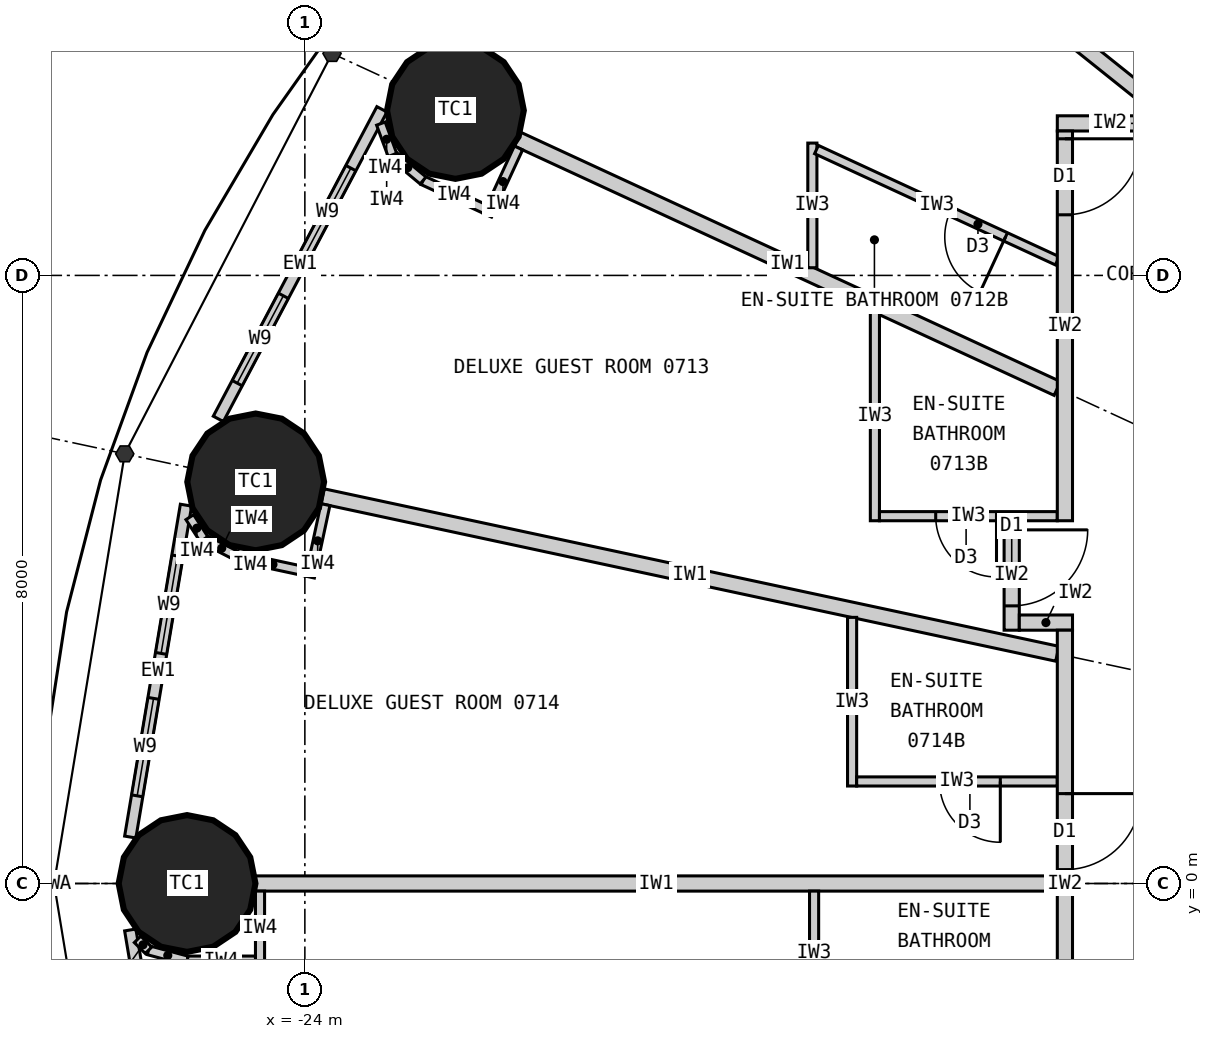
"""IFC4 building model, lengths in metres.
Left out: names, types, materials, properties, quantities, classifications, styles, units other than length and angle.
Written with IfcOpenShell. Run it as: python <this file> out.ifc"""

import sys

from ifc_helpers import new_model, si_unit, direction, frame, frame_2d, origin, origin_2d, place, context, subcontext, project, spatial, rectangle, circle, extrude, element, fill, save


model = new_model("IFC4")
c1 = context("Model", 3, precision=1e-05, world=origin(), true_north=direction((0.0, 1.0)))
c2 = subcontext(c1, "Body", "Model", "MODEL_VIEW")
j1 = project(units=[si_unit("LENGTHUNIT", "METRE"), si_unit("PLANEANGLEUNIT", "RADIAN")], contexts=[c1])
p1 = place(None, origin())
s1 = spatial("IfcSite", under=j1, at=p1, CompositionType="ELEMENT")
p2 = place(p1, origin())
s2 = spatial("IfcBuilding", under=s1, at=p2, CompositionType="ELEMENT")
p3 = place(p2, frame((0.0, 0.0, 36.0)))
s3 = spatial("IfcBuildingStorey", under=s2, at=p3, CompositionType="ELEMENT", Elevation=36.0)
for number, where, z_axis, x_axis in (
    (1, (-22.019, 10.17, 0.0), (0.0, 0.0, 1.0), (1.0, 0.0, 0.0)),
    (2, (-24.647, 5.283, 0.0), (0.0, 0.0, 1.0), (1.0, 0.0, 0.0)),
    (3, (-25.55, 0.0, 0.0), (0.0, 0.0, 1.0), (1.0, 0.0, 0.0)),
):
    element("IfcColumn", number, at=place(p3, frame(where, z_axis=z_axis, x_axis=x_axis)), inside=s3, PredefinedType="COLUMN", context=c2, shape_type="SweptSolid", body=[
        extrude(circle(Radius=0.9, at=origin_2d()), origin(), (0.0, 0.0, 1.0), 3.3),
    ])
p4 = place(p3, frame((-22.986, 10.185, 0.0), z_axis=(0.0, 0.0, 1.0), x_axis=(-0.467303182954, -0.884097129959, 0.0)))
e4 = element("IfcWall", 4, at=p4, inside=s3, PredefinedType="ELEMENTEDWALL", context=c2, shape_type="SweptSolid", body=[
    extrude(rectangle(XDim=4.606, YDim=0.15, at=frame_2d((2.303, 0.0))), origin(), (0.0, 0.0, 1.0), 3.12),
])
p5 = place(p4, frame((0.875, 0.0, 0.9)))
e5 = element("IfcOpeningElement", 5, at=p5, cuts=e4, PredefinedType="OPENING", context=c2, shape_type="SweptSolid", body=[
    extrude(rectangle(XDim=1.3, YDim=1.9, at=frame_2d((0.65, 0.95))), frame((0.0, 0.085, 0.0), z_axis=(0.0, -1.0, 0.0), x_axis=(1.0, 0.0, 0.0)), (0.0, 0.0, 1.0), 0.17),
])
p6 = place(p4, frame((2.775, 0.0, 0.9)))
e6 = element("IfcOpeningElement", 6, at=p6, cuts=e4, PredefinedType="OPENING", context=c2, shape_type="SweptSolid", body=[
    extrude(rectangle(XDim=1.3, YDim=1.9, at=frame_2d((0.65, 0.95))), frame((0.0, 0.085, 0.0), z_axis=(0.0, -1.0, 0.0), x_axis=(1.0, 0.0, 0.0)), (0.0, 0.0, 1.0), 0.17),
])
p7 = place(p3, frame((-25.564, 4.978, 0.0), z_axis=(0.0, 0.0, 1.0), x_axis=(-0.165641751141, -0.986185991727, 0.0)))
e7 = element("IfcWall", 7, at=p7, inside=s3, PredefinedType="ELEMENTEDWALL", context=c2, shape_type="SweptSolid", body=[
    extrude(rectangle(XDim=4.428, YDim=0.15, at=frame_2d((2.214, 0.0))), origin(), (0.0, 0.0, 1.0), 3.12),
])
p8 = place(p7, frame((0.678, 0.0, 0.9)))
e8 = element("IfcOpeningElement", 8, at=p8, cuts=e7, PredefinedType="OPENING", context=c2, shape_type="SweptSolid", body=[
    extrude(rectangle(XDim=1.3, YDim=1.9, at=frame_2d((0.65, 0.95))), frame((0.0, 0.085, 0.0), z_axis=(0.0, -1.0, 0.0), x_axis=(1.0, 0.0, 0.0)), (0.0, 0.0, 1.0), 0.17),
])
p9 = place(p7, frame((2.578, 0.0, 0.9)))
e9 = element("IfcOpeningElement", 9, at=p9, cuts=e7, PredefinedType="OPENING", context=c2, shape_type="SweptSolid", body=[
    extrude(rectangle(XDim=1.3, YDim=1.9, at=frame_2d((0.65, 0.95))), frame((0.0, 0.085, 0.0), z_axis=(0.0, -1.0, 0.0), x_axis=(1.0, 0.0, 0.0)), (0.0, 0.0, 1.0), 0.17),
])
p10 = place(p3, frame((-26.297, -0.611, 0.0), z_axis=(0.0, 0.0, 1.0), x_axis=(0.165641751141, -0.986185991727, 0.0)))
e10 = element("IfcWall", 10, at=p10, inside=s3, PredefinedType="ELEMENTEDWALL", context=c2, shape_type="SweptSolid", body=[
    extrude(rectangle(XDim=4.428, YDim=0.15, at=frame_2d((2.214, 0.0))), origin(), (0.0, 0.0, 1.0), 3.12),
])
p11 = place(p10, frame((0.55, 0.0, 0.9)))
e11 = element("IfcOpeningElement", 11, at=p11, cuts=e10, PredefinedType="OPENING", context=c2, shape_type="SweptSolid", body=[
    extrude(rectangle(XDim=1.3, YDim=1.9, at=frame_2d((0.65, 0.95))), frame((0.0, 0.085, 0.0), z_axis=(0.0, -1.0, 0.0), x_axis=(1.0, 0.0, 0.0)), (0.0, 0.0, 1.0), 0.17),
])
p12 = place(p10, frame((2.45, 0.0, 0.9)))
e12 = element("IfcOpeningElement", 12, at=p12, cuts=e10, PredefinedType="OPENING", context=c2, shape_type="SweptSolid", body=[
    extrude(rectangle(XDim=1.3, YDim=1.9, at=frame_2d((0.65, 0.95))), frame((0.0, 0.085, 0.0), z_axis=(0.0, -1.0, 0.0), x_axis=(1.0, 0.0, 0.0)), (0.0, 0.0, 1.0), 0.17),
])
p13 = place(p3, frame((-12.625, 10.1, 0.0), z_axis=(0.0, 0.0, 1.0), x_axis=(-0.780872884676, 0.624689953479, 0.0)))
e13 = element("IfcWall", 13, at=p13, inside=s3, PredefinedType="PARTITIONING", context=c2, shape_type="SweptSolid", body=[
    extrude(rectangle(XDim=5.845, YDim=0.2, at=frame_2d((2.922, 0.0))), origin(), (0.0, 0.0, 1.0), 2.32),
])
p14 = place(p3, frame((-14.1, 6.512, 0.0), z_axis=(0.0, 0.0, 1.0), x_axis=(-0.907842433118, 0.41931147925, 0.0)))
e14 = element("IfcWall", 14, at=p14, inside=s3, PredefinedType="PARTITIONING", context=c2, shape_type="SweptSolid", body=[
    extrude(rectangle(XDim=7.823, YDim=0.2, at=frame_2d((3.912, 0.0))), origin(), (0.0, 0.0, 1.0), 2.32),
])
p15 = place(p3, frame((-14.1, 3.022, 0.0), z_axis=(0.0, 0.0, 1.0), x_axis=(-0.977786510688, 0.209603290805, 0.0)))
e15 = element("IfcWall", 15, at=p15, inside=s3, PredefinedType="PARTITIONING", context=c2, shape_type="SweptSolid", body=[
    extrude(rectangle(XDim=9.887, YDim=0.2, at=frame_2d((4.943, 0.0))), origin(), (0.0, 0.0, 1.0), 2.32),
])
p16 = place(p3, frame((-14.1, 0.0, 0.0), z_axis=(0.0, 0.0, 1.0), x_axis=(-1.0, 0.0, 0.0)))
e16 = element("IfcWall", 16, at=p16, inside=s3, PredefinedType="PARTITIONING", context=c2, shape_type="SweptSolid", body=[
    extrude(rectangle(XDim=10.55, YDim=0.2, at=frame_2d((5.275, 0.0))), origin(), (0.0, 0.0, 1.0), 2.27),
])
p17 = place(p3, frame((-17.323, 8.101, 0.0), z_axis=(0.0, 0.0, 1.0), x_axis=(0.0, 1.0, 0.0)))
e17 = element("IfcWall", 17, at=p17, inside=s3, PredefinedType="PARTITIONING", context=c2, shape_type="SweptSolid", body=[
    extrude(rectangle(XDim=1.64, YDim=0.12, at=frame_2d((0.82, 0.0))), origin(), (0.0, 0.0, 1.0), 3.12),
])
p18 = place(p3, frame((-14.1, 8.193, 0.0), z_axis=(0.0, 0.0, 1.0), x_axis=(-0.907836493557, 0.419324338628, 0.0)))
e18 = element("IfcWall", 18, at=p18, inside=s3, PredefinedType="PARTITIONING", context=c2, shape_type="SweptSolid", body=[
    extrude(rectangle(XDim=3.49, YDim=0.12, at=frame_2d((1.745, 0.0))), origin(), (0.0, 0.0, 1.0), 3.12),
])
p19 = place(p18, frame((0.75, 0.0, 0.0)))
e19 = element("IfcOpeningElement", 19, at=p19, cuts=e18, PredefinedType="OPENING", context=c2, shape_type="SweptSolid", body=[
    extrude(rectangle(XDim=0.8, YDim=2.1, at=frame_2d((0.4, 1.05))), frame((0.0, 0.07, 0.0), z_axis=(0.0, -1.0, 0.0), x_axis=(1.0, 0.0, 0.0)), (0.0, 0.0, 1.0), 0.14),
])
p20 = place(p3, frame((-16.5, 7.521, 0.0), z_axis=(0.0, 0.0, 1.0), x_axis=(0.0, -1.0, 0.0)))
e20 = element("IfcWall", 20, at=p20, inside=s3, PredefinedType="PARTITIONING", context=c2, shape_type="SweptSolid", body=[
    extrude(rectangle(XDim=2.749, YDim=0.12, at=frame_2d((1.374, 0.0))), origin(), (0.0, 0.0, 1.0), 3.12),
])
p21 = place(p3, frame((-14.1, 4.833, 0.0), z_axis=(0.0, 0.0, 1.0), x_axis=(-1.0, 0.0, 0.0)))
e21 = element("IfcWall", 21, at=p21, inside=s3, PredefinedType="PARTITIONING", context=c2, shape_type="SweptSolid", body=[
    extrude(rectangle(XDim=2.34, YDim=0.12, at=frame_2d((1.17, 0.0))), origin(), (0.0, 0.0, 1.0), 3.12),
])
p22 = place(p21, frame((0.8, 0.0, 0.0)))
e22 = element("IfcOpeningElement", 22, at=p22, cuts=e21, PredefinedType="OPENING", context=c2, shape_type="SweptSolid", body=[
    extrude(rectangle(XDim=0.8, YDim=2.1, at=frame_2d((0.4, 1.05))), frame((0.0, 0.07, 0.0), z_axis=(0.0, -1.0, 0.0), x_axis=(1.0, 0.0, 0.0)), (0.0, 0.0, 1.0), 0.14),
])
p23 = place(p3, frame((-16.8, 3.501, 0.0), z_axis=(0.0, 0.0, 1.0), x_axis=(0.0, -1.0, 0.0)))
e23 = element("IfcWall", 23, at=p23, inside=s3, PredefinedType="PARTITIONING", context=c2, shape_type="SweptSolid", body=[
    extrude(rectangle(XDim=2.219, YDim=0.12, at=frame_2d((1.109, 0.0))), origin(), (0.0, 0.0, 1.0), 3.12),
])
p24 = place(p3, frame((-14.1, 1.343, 0.0), z_axis=(0.0, 0.0, 1.0), x_axis=(-1.0, 0.0, 0.0)))
e24 = element("IfcWall", 24, at=p24, inside=s3, PredefinedType="PARTITIONING", context=c2, shape_type="SweptSolid", body=[
    extrude(rectangle(XDim=2.64, YDim=0.12, at=frame_2d((1.32, 0.0))), origin(), (0.0, 0.0, 1.0), 3.12),
])
p25 = place(p24, frame((0.75, 0.0, 0.0)))
e25 = element("IfcOpeningElement", 25, at=p25, cuts=e24, PredefinedType="OPENING", context=c2, shape_type="SweptSolid", body=[
    extrude(rectangle(XDim=0.8, YDim=2.1, at=frame_2d((0.4, 1.05))), frame((0.0, 0.07, 0.0), z_axis=(0.0, -1.0, 0.0), x_axis=(1.0, 0.0, 0.0)), (0.0, 0.0, 1.0), 0.14),
])
p26 = place(p3, frame((-17.3, -0.1, 0.0), z_axis=(0.0, 0.0, 1.0), x_axis=(0.0, -1.0, 0.0)))
e26 = element("IfcWall", 26, at=p26, inside=s3, PredefinedType="PARTITIONING", context=c2, shape_type="SweptSolid", body=[
    extrude(rectangle(XDim=1.64, YDim=0.12, at=frame_2d((0.82, 0.0))), origin(), (0.0, 0.0, 1.0), 3.12),
])
p27 = place(p3, frame((-14.7, 4.772, 0.0), z_axis=(0.0, 0.0, 1.0), x_axis=(0.0, -1.0, 0.0)))
e27 = element("IfcWall", 27, at=p27, inside=s3, PredefinedType="PARTITIONING", context=c2, shape_type="SweptSolid", body=[
    extrude(rectangle(XDim=1.44, YDim=0.2, at=frame_2d((0.72, 0.0))), origin(), (0.0, 0.0, 1.0), 3.12),
])
p28 = place(p27, frame((0.12, 0.0, 0.0)))
e28 = element("IfcOpeningElement", 28, at=p28, cuts=e27, PredefinedType="OPENING", context=c2, shape_type="SweptSolid", body=[
    extrude(rectangle(XDim=1.0, YDim=2.2, at=frame_2d((0.5, 1.1))), frame((0.0, 0.11, 0.0), z_axis=(0.0, -1.0, 0.0), x_axis=(1.0, 0.0, 0.0)), (0.0, 0.0, 1.0), 0.22),
])
p29 = place(p3, frame((-13.9, 3.433, 0.0), z_axis=(0.0, 0.0, 1.0), x_axis=(-1.0, 0.0, 0.0)))
e29 = element("IfcWall", 29, at=p29, inside=s3, PredefinedType="PARTITIONING", context=c2, shape_type="SweptSolid", body=[
    extrude(rectangle(XDim=0.7, YDim=0.2, at=frame_2d((0.35, 0.0))), origin(), (0.0, 0.0, 1.0), 2.32),
])
p30 = place(p3, frame((-14.1, 10.0, 0.0), z_axis=(0.0, 0.0, 1.0), x_axis=(1.0, 0.0, 0.0)))
e30 = element("IfcWall", 30, at=p30, inside=s3, PredefinedType="PARTITIONING", context=c2, shape_type="SweptSolid", body=[
    extrude(rectangle(XDim=2.481, YDim=0.2, at=frame_2d((1.24, 0.0))), origin(), (0.0, 0.0, 1.0), 3.12),
])
p31 = place(p3, frame((-14.0, 9.9, 0.0), z_axis=(0.0, 0.0, 1.0), x_axis=(0.0, -1.0, 0.0)))
e31 = element("IfcWall", 31, at=p31, inside=s3, PredefinedType="PARTITIONING", context=c2, shape_type="SweptSolid", body=[
    extrude(rectangle(XDim=5.127, YDim=0.2, at=frame_2d((2.564, 0.0))), origin(), (0.0, 0.0, 1.0), 3.12),
])
p32 = place(p31, frame((0.103, 0.0, 0.0)))
e32 = element("IfcOpeningElement", 32, at=p32, cuts=e31, PredefinedType="OPENING", context=c2, shape_type="SweptSolid", body=[
    extrude(rectangle(XDim=1.0, YDim=2.2, at=frame_2d((0.5, 1.1))), frame((0.0, 0.11, 0.0), z_axis=(0.0, -1.0, 0.0), x_axis=(1.0, 0.0, 0.0)), (0.0, 0.0, 1.0), 0.22),
])
p33 = place(p3, frame((-14.0, 3.333, 0.0), z_axis=(0.0, 0.0, 1.0), x_axis=(0.0, -1.0, 0.0)))
e33 = element("IfcWall", 33, at=p33, inside=s3, PredefinedType="PARTITIONING", context=c2, shape_type="SweptSolid", body=[
    extrude(rectangle(XDim=6.665, YDim=0.2, at=frame_2d((3.333, 0.0))), origin(), (0.0, 0.0, 1.0), 3.12),
])
p34 = place(p33, frame((2.15, 0.0, 0.0)))
e34 = element("IfcOpeningElement", 34, at=p34, cuts=e33, PredefinedType="OPENING", context=c2, shape_type="SweptSolid", body=[
    extrude(rectangle(XDim=1.0, YDim=2.2, at=frame_2d((0.5, 1.1))), frame((0.0, 0.11, 0.0), z_axis=(0.0, -1.0, 0.0), x_axis=(1.0, 0.0, 0.0)), (0.0, 0.0, 1.0), 0.22),
])
p35 = place(p33, frame((5.173, 0.0, 0.0)))
e35 = element("IfcOpeningElement", 35, at=p35, cuts=e33, PredefinedType="OPENING", context=c2, shape_type="SweptSolid", body=[
    extrude(rectangle(XDim=1.0, YDim=2.2, at=frame_2d((0.5, 1.1))), frame((0.0, 0.11, 0.0), z_axis=(0.0, -1.0, 0.0), x_axis=(1.0, 0.0, 0.0)), (0.0, 0.0, 1.0), 0.22),
])
p36 = place(p3, frame((-21.189, 9.677, 0.0), z_axis=(0.0, 0.0, 1.0), x_axis=(-0.419344098106, -0.907827366509, 0.0)))
e36 = element("IfcWall", 36, at=p36, inside=s3, PredefinedType="PARTITIONING", context=c2, shape_type="SweptSolid", body=[
    extrude(rectangle(XDim=0.975, YDim=0.12, at=frame_2d((0.487, 0.0))), origin(), (0.0, 0.0, 1.0), 3.12),
])
p37 = place(p3, frame((-21.627, 8.872, 0.0), z_axis=(0.0, 0.0, 1.0), x_axis=(-0.907935564339, 0.419109783957, 0.0)))
e37 = element("IfcWall", 37, at=p37, inside=s3, PredefinedType="PARTITIONING", context=c2, shape_type="SweptSolid", body=[
    extrude(rectangle(XDim=0.9, YDim=0.12, at=frame_2d((0.45, 0.0))), origin(), (0.0, 0.0, 1.0), 3.12),
])
p38 = place(p3, frame((-22.445, 9.249, 0.0), z_axis=(0.0, 0.0, 1.0), x_axis=(-0.768335565584, 0.640047231584, 0.0)))
e38 = element("IfcWall", 38, at=p38, inside=s3, PredefinedType="PARTITIONING", context=c2, shape_type="SweptSolid", body=[
    extrude(rectangle(XDim=0.525, YDim=0.12, at=frame_2d((0.263, 0.0))), origin(), (0.0, 0.0, 1.0), 3.12),
])
p39 = place(p3, frame((-22.848, 9.585, 0.0), z_axis=(0.0, 0.0, 1.0), x_axis=(-0.345267312673, 0.938504386138, 0.0)))
e39 = element("IfcWall", 39, at=p39, inside=s3, PredefinedType="PARTITIONING", context=c2, shape_type="SweptSolid", body=[
    extrude(rectangle(XDim=0.439, YDim=0.12, at=frame_2d((0.22, 0.0))), origin(), (0.0, 0.0, 1.0), 3.12),
])
p40 = place(p3, frame((-23.729, 4.984, 0.0), z_axis=(0.0, 0.0, 1.0), x_axis=(-0.20968306268, -0.977769406979, 0.0)))
e40 = element("IfcWall", 40, at=p40, inside=s3, PredefinedType="PARTITIONING", context=c2, shape_type="SweptSolid", body=[
    extrude(rectangle(XDim=0.975, YDim=0.12, at=frame_2d((0.487, 0.0))), origin(), (0.0, 0.0, 1.0), 3.12),
])
p41 = place(p3, frame((-23.98, 4.103, 0.0), z_axis=(0.0, 0.0, 1.0), x_axis=(-0.977762694187, 0.209714362543, 0.0)))
e41 = element("IfcWall", 41, at=p41, inside=s3, PredefinedType="PARTITIONING", context=c2, shape_type="SweptSolid", body=[
    extrude(rectangle(XDim=0.9, YDim=0.12, at=frame_2d((0.45, 0.0))), origin(), (0.0, 0.0, 1.0), 3.12),
])
p42 = place(p3, frame((-24.86, 4.291, 0.0), z_axis=(0.0, 0.0, 1.0), x_axis=(-0.890204323062, 0.455561481254, 0.0)))
e42 = element("IfcWall", 42, at=p42, inside=s3, PredefinedType="PARTITIONING", context=c2, shape_type="SweptSolid", body=[
    extrude(rectangle(XDim=0.525, YDim=0.12, at=frame_2d((0.263, 0.0))), origin(), (0.0, 0.0, 1.0), 3.12),
])
p43 = place(p3, frame((-25.327, 4.531, 0.0), z_axis=(0.0, 0.0, 1.0), x_axis=(-0.543516034791, 0.839398784801, 0.0)))
e43 = element("IfcWall", 43, at=p43, inside=s3, PredefinedType="PARTITIONING", context=c2, shape_type="SweptSolid", body=[
    extrude(rectangle(XDim=0.344, YDim=0.12, at=frame_2d((0.172, 0.0))), origin(), (0.0, 0.0, 1.0), 3.12),
])
p44 = place(p3, frame((-24.59, -0.1, 0.0), z_axis=(0.0, 0.0, 1.0), x_axis=(0.0, -1.0, 0.0)))
e44 = element("IfcWall", 44, at=p44, inside=s3, PredefinedType="PARTITIONING", context=c2, shape_type="SweptSolid", body=[
    extrude(rectangle(XDim=0.974, YDim=0.12, at=frame_2d((0.487, 0.0))), origin(), (0.0, 0.0, 1.0), 3.12),
])
p45 = place(p3, frame((-24.65, -1.015, 0.0), z_axis=(0.0, 0.0, 1.0), x_axis=(-1.0, 0.0, 0.0)))
e45 = element("IfcWall", 45, at=p45, inside=s3, PredefinedType="PARTITIONING", context=c2, shape_type="SweptSolid", body=[
    extrude(rectangle(XDim=0.9, YDim=0.12, at=frame_2d((0.45, 0.0))), origin(), (0.0, 0.0, 1.0), 3.12),
])
p46 = place(p3, frame((-25.55, -1.015, 0.0), z_axis=(0.0, 0.0, 1.0), x_axis=(-0.96590239779, 0.258906465625, 0.0)))
e46 = element("IfcWall", 46, at=p46, inside=s3, PredefinedType="PARTITIONING", context=c2, shape_type="SweptSolid", body=[
    extrude(rectangle(XDim=0.525, YDim=0.12, at=frame_2d((0.263, 0.0))), origin(), (0.0, 0.0, 1.0), 3.12),
])
p47 = place(p3, frame((-26.057, -0.879, 0.0), z_axis=(0.0, 0.0, 1.0), x_axis=(-0.707106781187, 0.707106781187, 0.0)))
e47 = element("IfcWall", 47, at=p47, inside=s3, PredefinedType="PARTITIONING", context=c2, shape_type="SweptSolid", body=[
    extrude(rectangle(XDim=0.204, YDim=0.12, at=frame_2d((0.102, 0.0))), origin(), (0.0, 0.0, 1.0), 3.12),
])
p48 = place(p5, origin())
e48 = element("IfcWindow", 48, at=p48, inside=s3, PartitioningType="SINGLE_PANEL", PredefinedType="WINDOW", context=c2, shape_type="SweptSolid", body=[
    extrude(rectangle(XDim=1.3, YDim=1.9, at=frame_2d((0.65, 0.95))), frame((0.0, 0.03, 0.0), z_axis=(0.0, -1.0, 0.0), x_axis=(1.0, 0.0, 0.0)), (0.0, 0.0, 1.0), 0.06),
])
fill(e5, e48)
p49 = place(p6, origin())
e49 = element("IfcWindow", 49, at=p49, inside=s3, PartitioningType="SINGLE_PANEL", PredefinedType="WINDOW", context=c2, shape_type="SweptSolid", body=[
    extrude(rectangle(XDim=1.3, YDim=1.9, at=frame_2d((0.65, 0.95))), frame((0.0, 0.03, 0.0), z_axis=(0.0, -1.0, 0.0), x_axis=(1.0, 0.0, 0.0)), (0.0, 0.0, 1.0), 0.06),
])
fill(e6, e49)
p50 = place(p8, origin())
e50 = element("IfcWindow", 50, at=p50, inside=s3, PartitioningType="SINGLE_PANEL", PredefinedType="WINDOW", context=c2, shape_type="SweptSolid", body=[
    extrude(rectangle(XDim=1.3, YDim=1.9, at=frame_2d((0.65, 0.95))), frame((0.0, 0.03, 0.0), z_axis=(0.0, -1.0, 0.0), x_axis=(1.0, 0.0, 0.0)), (0.0, 0.0, 1.0), 0.06),
])
fill(e8, e50)
p51 = place(p9, origin())
e51 = element("IfcWindow", 51, at=p51, inside=s3, PartitioningType="SINGLE_PANEL", PredefinedType="WINDOW", context=c2, shape_type="SweptSolid", body=[
    extrude(rectangle(XDim=1.3, YDim=1.9, at=frame_2d((0.65, 0.95))), frame((0.0, 0.03, 0.0), z_axis=(0.0, -1.0, 0.0), x_axis=(1.0, 0.0, 0.0)), (0.0, 0.0, 1.0), 0.06),
])
fill(e9, e51)
p52 = place(p19, origin())
e52 = element("IfcDoor", 52, at=p52, inside=s3, OperationType="SINGLE_SWING_LEFT", PredefinedType="DOOR", context=c2, shape_type="SweptSolid", body=[
    extrude(rectangle(XDim=0.8, YDim=2.1, at=frame_2d((0.4, 1.05))), frame((0.0, 0.025, 0.0), z_axis=(0.0, -1.0, 0.0), x_axis=(1.0, 0.0, 0.0)), (0.0, 0.0, 1.0), 0.05),
])
fill(e19, e52)
p53 = place(p32, origin())
e53 = element("IfcDoor", 53, at=p53, inside=s3, OperationType="SINGLE_SWING_LEFT", PredefinedType="DOOR", context=c2, shape_type="SweptSolid", body=[
    extrude(rectangle(XDim=1.0, YDim=2.2, at=frame_2d((0.5, 1.1))), frame((0.0, 0.025, 0.0), z_axis=(0.0, -1.0, 0.0), x_axis=(1.0, 0.0, 0.0)), (0.0, 0.0, 1.0), 0.05),
])
fill(e32, e53)
p54 = place(p22, origin())
e54 = element("IfcDoor", 54, at=p54, inside=s3, OperationType="SINGLE_SWING_LEFT", PredefinedType="DOOR", context=c2, shape_type="SweptSolid", body=[
    extrude(rectangle(XDim=0.8, YDim=2.1, at=frame_2d((0.4, 1.05))), frame((0.0, 0.025, 0.0), z_axis=(0.0, -1.0, 0.0), x_axis=(1.0, 0.0, 0.0)), (0.0, 0.0, 1.0), 0.05),
])
fill(e22, e54)
p55 = place(p28, origin())
e55 = element("IfcDoor", 55, at=p55, inside=s3, OperationType="SINGLE_SWING_LEFT", PredefinedType="DOOR", context=c2, shape_type="SweptSolid", body=[
    extrude(rectangle(XDim=1.0, YDim=2.2, at=frame_2d((0.5, 1.1))), frame((0.0, 0.025, 0.0), z_axis=(0.0, -1.0, 0.0), x_axis=(1.0, 0.0, 0.0)), (0.0, 0.0, 1.0), 0.05),
])
fill(e28, e55)
p56 = place(p25, origin())
e56 = element("IfcDoor", 56, at=p56, inside=s3, OperationType="SINGLE_SWING_LEFT", PredefinedType="DOOR", context=c2, shape_type="SweptSolid", body=[
    extrude(rectangle(XDim=0.8, YDim=2.1, at=frame_2d((0.4, 1.05))), frame((0.0, 0.025, 0.0), z_axis=(0.0, -1.0, 0.0), x_axis=(1.0, 0.0, 0.0)), (0.0, 0.0, 1.0), 0.05),
])
fill(e25, e56)
p57 = place(p34, origin())
e57 = element("IfcDoor", 57, at=p57, inside=s3, OperationType="SINGLE_SWING_LEFT", PredefinedType="DOOR", context=c2, shape_type="SweptSolid", body=[
    extrude(rectangle(XDim=1.0, YDim=2.2, at=frame_2d((0.5, 1.1))), frame((0.0, 0.025, 0.0), z_axis=(0.0, -1.0, 0.0), x_axis=(1.0, 0.0, 0.0)), (0.0, 0.0, 1.0), 0.05),
])
fill(e34, e57)
save(model, sys.argv[1])
